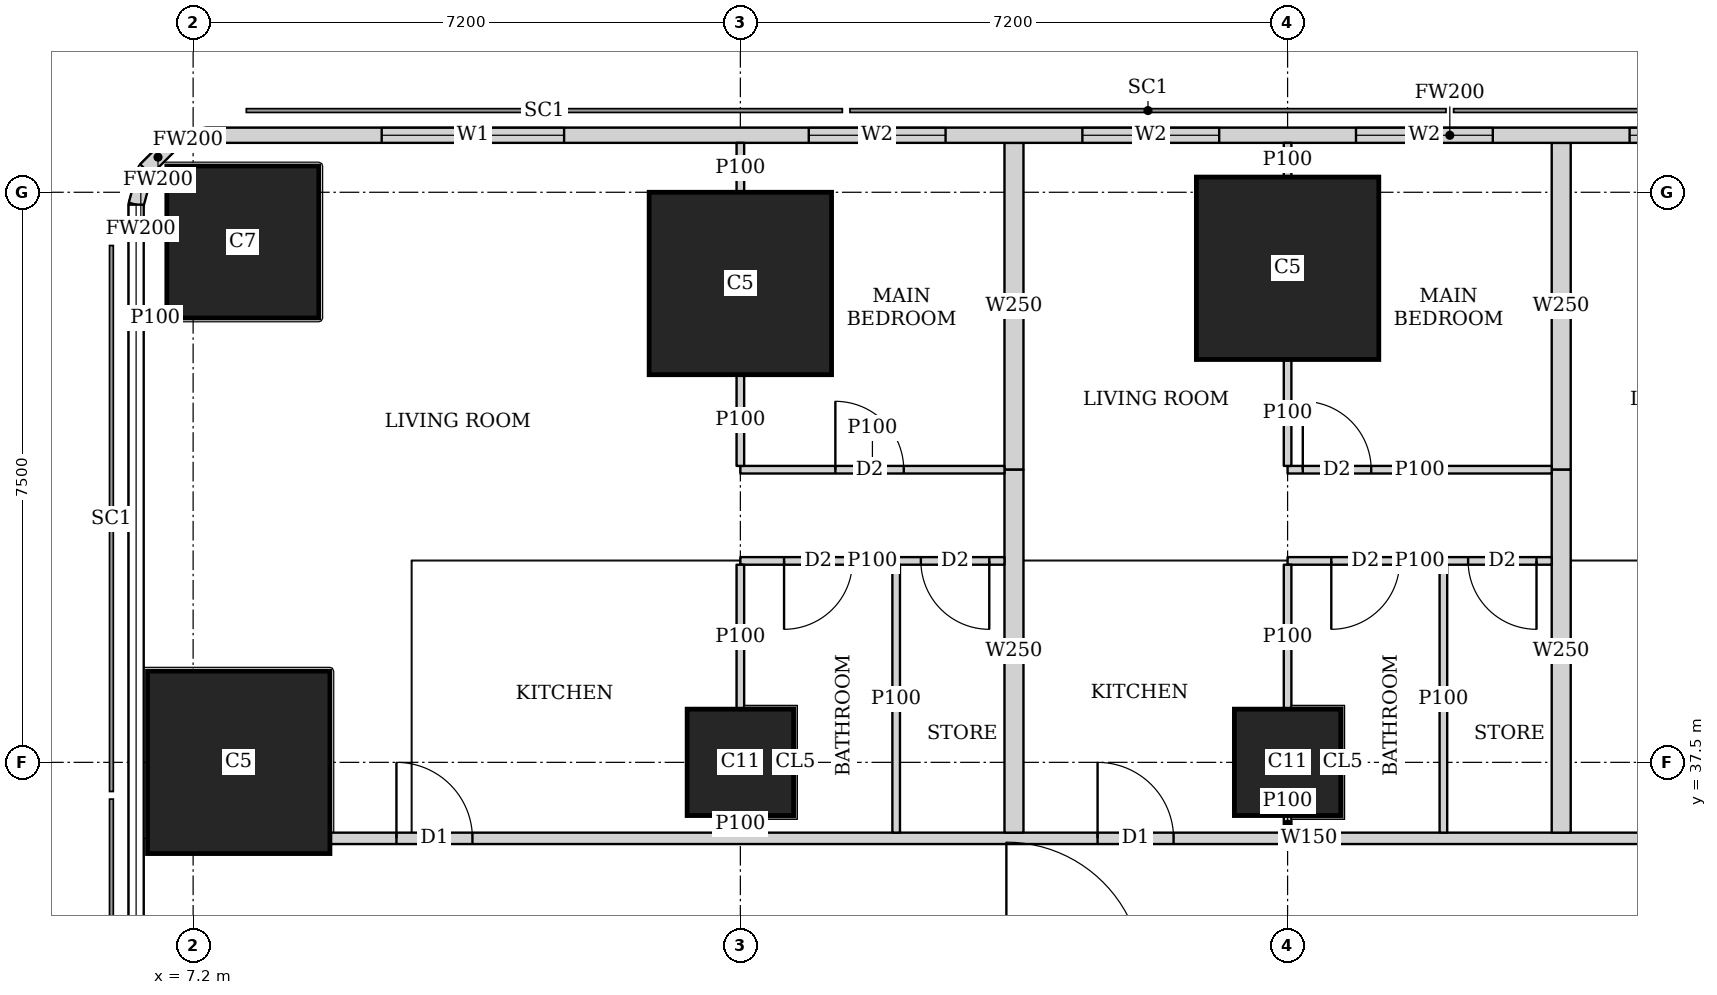
"""IFC4 building model, lengths in metres.
Left out: names, types, materials, properties, quantities, classifications, styles, units other than length and angle.
Written with IfcOpenShell. Run it as: python <this file> out.ifc"""

import sys

from ifc_helpers import new_model, si_unit, direction, frame, frame_2d, origin, origin_2d, place, context, subcontext, project, spatial, rectangle, extrude, element, fill, save


model = new_model("IFC4")
c1 = context("Model", 3, precision=1e-05, world=origin(), true_north=direction((0.0, 1.0)))
c2 = subcontext(c1, "Body", "Model", "MODEL_VIEW")
j1 = project(units=[si_unit("LENGTHUNIT", "METRE"), si_unit("PLANEANGLEUNIT", "RADIAN")], contexts=[c1])
p1 = place(None, origin())
s1 = spatial("IfcSite", under=j1, at=p1, CompositionType="ELEMENT")
p2 = place(p1, origin())
s2 = spatial("IfcBuilding", under=s1, at=p2, CompositionType="ELEMENT")
p3 = place(p2, frame((0.0, 0.0, 208.7)))
s3 = spatial("IfcBuildingStorey", under=s2, at=p3, CompositionType="ELEMENT", Elevation=208.7)
p4 = place(p3, frame((7.8, 37.5, 0.0), z_axis=(0.0, 0.0, 1.0), x_axis=(1.0, 0.0, 0.0)))
e1 = element("IfcColumn", 1, at=p4, inside=s3, PredefinedType="COLUMN", context=c2, shape_type="SweptSolid", body=[
    extrude(rectangle(XDim=2.4, YDim=2.4, at=origin_2d()), origin(), (0.0, 0.0, 1.0), 3.75),
])
for number, where, z_axis, x_axis in (
    (2, (14.4, 37.5, 0.0), (0.0, 0.0, 1.0), (1.0, 0.0, 0.0)),
    (3, (21.6, 37.5, 0.0), (0.0, 0.0, 1.0), (1.0, 0.0, 0.0)),
):
    element("IfcColumn", number, at=place(p3, frame(where, z_axis=z_axis, x_axis=x_axis)), inside=s3, PredefinedType="COLUMN", context=c2, shape_type="SweptSolid", body=[
        extrude(rectangle(XDim=1.4, YDim=1.4, at=origin_2d()), origin(), (0.0, 0.0, 1.0), 3.75),
    ])
p5 = place(p3, frame((7.854, 44.346, 0.0), z_axis=(0.0, 0.0, 1.0), x_axis=(1.0, 0.0, 0.0)))
e4 = element("IfcColumn", 4, at=p5, inside=s3, PredefinedType="COLUMN", context=c2, shape_type="SweptSolid", body=[
    extrude(rectangle(XDim=2.0, YDim=2.0, at=origin_2d()), origin(), (0.0, 0.0, 1.0), 3.75),
])
for number, where, z_axis, x_axis in (
    (5, (14.4, 43.8, 0.0), (0.0, 0.0, 1.0), (1.0, 0.0, 0.0)),
    (6, (21.6, 44.0, 0.0), (0.0, 0.0, 1.0), (1.0, 0.0, 0.0)),
):
    element("IfcColumn", number, at=place(p3, frame(where, z_axis=z_axis, x_axis=x_axis)), inside=s3, PredefinedType="COLUMN", context=c2, shape_type="SweptSolid", body=[
        extrude(rectangle(XDim=2.4, YDim=2.4, at=origin_2d()), origin(), (0.0, 0.0, 1.0), 3.75),
    ])
p6 = place(p3, frame((40.106, 45.75, 0.0), z_axis=(0.0, 0.0, 1.0), x_axis=(-1.0, 0.0, 0.0)))
e7 = element("IfcWall", 7, at=p6, inside=s3, PredefinedType="SOLIDWALL", context=c2, shape_type="SweptSolid", body=[
    extrude(rectangle(XDim=32.743, YDim=0.2, at=frame_2d((16.372, 0.0))), origin(), (0.0, 0.0, 1.0), 3.5),
])
p7 = place(p6, frame((8.606, 0.0, 0.9)))
e8 = element("IfcOpeningElement", 8, at=p7, cuts=e7, PredefinedType="OPENING", context=c2, shape_type="SweptSolid", body=[
    extrude(rectangle(XDim=1.8, YDim=1.5, at=frame_2d((0.9, 0.75))), frame((0.0, 0.11, 0.0), z_axis=(0.0, -1.0, 0.0), x_axis=(1.0, 0.0, 0.0)), (0.0, 0.0, 1.0), 0.22),
])
p8 = place(p6, frame((12.206, 0.0, 0.9)))
e9 = element("IfcOpeningElement", 9, at=p8, cuts=e7, PredefinedType="OPENING", context=c2, shape_type="SweptSolid", body=[
    extrude(rectangle(XDim=1.8, YDim=1.5, at=frame_2d((0.9, 0.75))), frame((0.0, 0.11, 0.0), z_axis=(0.0, -1.0, 0.0), x_axis=(1.0, 0.0, 0.0)), (0.0, 0.0, 1.0), 0.22),
])
p9 = place(p6, frame((15.806, 0.0, 0.9)))
e10 = element("IfcOpeningElement", 10, at=p9, cuts=e7, PredefinedType="OPENING", context=c2, shape_type="SweptSolid", body=[
    extrude(rectangle(XDim=1.8, YDim=1.5, at=frame_2d((0.9, 0.75))), frame((0.0, 0.11, 0.0), z_axis=(0.0, -1.0, 0.0), x_axis=(1.0, 0.0, 0.0)), (0.0, 0.0, 1.0), 0.22),
])
p10 = place(p6, frame((19.406, 0.0, 0.9)))
e11 = element("IfcOpeningElement", 11, at=p10, cuts=e7, PredefinedType="OPENING", context=c2, shape_type="SweptSolid", body=[
    extrude(rectangle(XDim=1.8, YDim=1.5, at=frame_2d((0.9, 0.75))), frame((0.0, 0.11, 0.0), z_axis=(0.0, -1.0, 0.0), x_axis=(1.0, 0.0, 0.0)), (0.0, 0.0, 1.0), 0.22),
])
p11 = place(p6, frame((23.006, 0.0, 0.9)))
e12 = element("IfcOpeningElement", 12, at=p11, cuts=e7, PredefinedType="OPENING", context=c2, shape_type="SweptSolid", body=[
    extrude(rectangle(XDim=1.8, YDim=1.5, at=frame_2d((0.9, 0.75))), frame((0.0, 0.11, 0.0), z_axis=(0.0, -1.0, 0.0), x_axis=(1.0, 0.0, 0.0)), (0.0, 0.0, 1.0), 0.22),
])
p12 = place(p6, frame((28.025, 0.0, 0.9)))
e13 = element("IfcOpeningElement", 13, at=p12, cuts=e7, PredefinedType="OPENING", context=c2, shape_type="SweptSolid", body=[
    extrude(rectangle(XDim=2.4, YDim=1.5, at=frame_2d((1.2, 0.75))), frame((0.0, 0.11, 0.0), z_axis=(0.0, -1.0, 0.0), x_axis=(1.0, 0.0, 0.0)), (0.0, 0.0, 1.0), 0.22),
])
p13 = place(p3, frame((7.363, 45.75, 0.0), z_axis=(0.0, 0.0, 1.0), x_axis=(-0.965655254015, -0.259826731483, 0.0)))
e14 = element("IfcWall", 14, at=p13, inside=s3, PredefinedType="SOLIDWALL", context=c2, shape_type="SweptSolid", body=[
    extrude(rectangle(XDim=0.477, YDim=0.2, at=frame_2d((0.239, 0.0))), origin(), (0.0, 0.0, 1.0), 3.5),
])
p14 = place(p3, frame((6.902, 45.626, 0.0), z_axis=(0.0, 0.0, 1.0), x_axis=(-0.707369890659, -0.706843573776, 0.0)))
e15 = element("IfcWall", 15, at=p14, inside=s3, PredefinedType="SOLIDWALL", context=c2, shape_type="SweptSolid", body=[
    extrude(rectangle(XDim=0.464, YDim=0.2, at=frame_2d((0.232, 0.0))), origin(), (0.0, 0.0, 1.0), 3.5),
])
p15 = place(p3, frame((6.574, 45.298, 0.0), z_axis=(0.0, 0.0, 1.0), x_axis=(-0.259698463175, -0.965689757751, 0.0)))
e16 = element("IfcWall", 16, at=p15, inside=s3, PredefinedType="SOLIDWALL", context=c2, shape_type="SweptSolid", body=[
    extrude(rectangle(XDim=0.478, YDim=0.2, at=frame_2d((0.239, 0.0))), origin(), (0.0, 0.0, 1.0), 3.5),
])
p16 = place(p3, frame((9.001, 36.5, 0.0), z_axis=(0.0, 0.0, 1.0), x_axis=(1.0, 0.0, 0.0)))
e17 = element("IfcWall", 17, at=p16, inside=s3, PredefinedType="SOLIDWALL", context=c2, shape_type="SweptSolid", body=[
    extrude(rectangle(XDim=25.764, YDim=0.15, at=frame_2d((12.882, 0.0))), origin(), (0.0, 0.0, 1.0), 3.5),
])
p17 = place(p16, frame((0.874, 0.0, 0.0)))
e18 = element("IfcOpeningElement", 18, at=p17, cuts=e17, PredefinedType="OPENING", context=c2, shape_type="SweptSolid", body=[
    extrude(rectangle(XDim=1.0, YDim=2.1, at=frame_2d((0.5, 1.05))), frame((0.0, 0.085, 0.0), z_axis=(0.0, -1.0, 0.0), x_axis=(1.0, 0.0, 0.0)), (0.0, 0.0, 1.0), 0.17),
])
p18 = place(p16, frame((10.099, 0.0, 0.0)))
e19 = element("IfcOpeningElement", 19, at=p18, cuts=e17, PredefinedType="OPENING", context=c2, shape_type="SweptSolid", body=[
    extrude(rectangle(XDim=1.0, YDim=2.1, at=frame_2d((0.5, 1.05))), frame((0.0, 0.085, 0.0), z_axis=(0.0, -1.0, 0.0), x_axis=(1.0, 0.0, 0.0)), (0.0, 0.0, 1.0), 0.17),
])
p19 = place(p16, frame((17.356, 0.0, 0.0)))
e20 = element("IfcOpeningElement", 20, at=p19, cuts=e17, PredefinedType="OPENING", context=c2, shape_type="SweptSolid", body=[
    extrude(rectangle(XDim=1.0, YDim=2.1, at=frame_2d((0.5, 1.05))), frame((0.0, 0.085, 0.0), z_axis=(0.0, -1.0, 0.0), x_axis=(1.0, 0.0, 0.0)), (0.0, 0.0, 1.0), 0.17),
])
p20 = place(p3, frame((6.854, 43.346, 0.0), z_axis=(0.0, 0.0, 1.0), x_axis=(-1.0, 0.0, 0.0)))
e21 = element("IfcWall", 21, at=p20, inside=s3, PredefinedType="PARTITIONING", context=c2, shape_type="SweptSolid", body=[
    extrude(rectangle(XDim=0.304, YDim=0.1, at=frame_2d((0.152, 0.0))), origin(), (0.0, 0.0, 1.0), 2.05),
])
p21 = place(p3, frame((14.4, 41.35, 0.0), z_axis=(0.0, 0.0, 1.0), x_axis=(1.0, 0.0, 0.0)))
e22 = element("IfcWall", 22, at=p21, inside=s3, PredefinedType="PARTITIONING", context=c2, shape_type="SweptSolid", body=[
    extrude(rectangle(XDim=3.475, YDim=0.1, at=frame_2d((1.738, 0.0))), origin(), (0.0, 0.0, 1.0), 3.5),
])
p22 = place(p21, frame((1.25, 0.0, 0.0)))
e23 = element("IfcOpeningElement", 23, at=p22, cuts=e22, PredefinedType="OPENING", context=c2, shape_type="SweptSolid", body=[
    extrude(rectangle(XDim=0.9, YDim=2.1, at=frame_2d((0.45, 1.05))), frame((0.0, 0.06, 0.0), z_axis=(0.0, -1.0, 0.0), x_axis=(1.0, 0.0, 0.0)), (0.0, 0.0, 1.0), 0.12),
])
p23 = place(p3, frame((14.4, 40.15, 0.0), z_axis=(0.0, 0.0, 1.0), x_axis=(1.0, 0.0, 0.0)))
e24 = element("IfcWall", 24, at=p23, inside=s3, PredefinedType="PARTITIONING", context=c2, shape_type="SweptSolid", body=[
    extrude(rectangle(XDim=3.475, YDim=0.1, at=frame_2d((1.738, 0.0))), origin(), (0.0, 0.0, 1.0), 3.5),
])
p24 = place(p23, frame((0.575, 0.0, 0.0)))
e25 = element("IfcOpeningElement", 25, at=p24, cuts=e24, PredefinedType="OPENING", context=c2, shape_type="SweptSolid", body=[
    extrude(rectangle(XDim=0.9, YDim=2.1, at=frame_2d((0.45, 1.05))), frame((0.0, 0.06, 0.0), z_axis=(0.0, -1.0, 0.0), x_axis=(1.0, 0.0, 0.0)), (0.0, 0.0, 1.0), 0.12),
])
p25 = place(p23, frame((2.375, 0.0, 0.0)))
e26 = element("IfcOpeningElement", 26, at=p25, cuts=e24, PredefinedType="OPENING", context=c2, shape_type="SweptSolid", body=[
    extrude(rectangle(XDim=0.9, YDim=2.1, at=frame_2d((0.45, 1.05))), frame((0.0, 0.06, 0.0), z_axis=(0.0, -1.0, 0.0), x_axis=(1.0, 0.0, 0.0)), (0.0, 0.0, 1.0), 0.12),
])
p26 = place(p3, frame((14.4, 41.4, 0.0), z_axis=(0.0, 0.0, 1.0), x_axis=(0.0, 1.0, 0.0)))
e27 = element("IfcWall", 27, at=p26, inside=s3, PredefinedType="PARTITIONING", context=c2, shape_type="SweptSolid", body=[
    extrude(rectangle(XDim=1.199, YDim=0.1, at=frame_2d((0.6, 0.0))), origin(), (0.0, 0.0, 1.0), 3.5),
])
p27 = place(p3, frame((14.4, 45.001, 0.0), z_axis=(0.0, 0.0, 1.0), x_axis=(0.0, 1.0, 0.0)))
e28 = element("IfcWall", 28, at=p27, inside=s3, PredefinedType="PARTITIONING", context=c2, shape_type="SweptSolid", body=[
    extrude(rectangle(XDim=0.649, YDim=0.1, at=frame_2d((0.324, 0.0))), origin(), (0.0, 0.0, 1.0), 3.5),
])
p28 = place(p3, frame((14.4, 36.575, 0.0), z_axis=(0.0, 0.0, 1.0), x_axis=(0.0, 1.0, 0.0)))
e29 = element("IfcWall", 29, at=p28, inside=s3, PredefinedType="PARTITIONING", context=c2, shape_type="SweptSolid", body=[
    extrude(rectangle(XDim=0.224, YDim=0.1, at=frame_2d((0.112, 0.0))), origin(), (0.0, 0.0, 1.0), 3.5),
])
p29 = place(p3, frame((14.4, 38.201, 0.0), z_axis=(0.0, 0.0, 1.0), x_axis=(0.0, 1.0, 0.0)))
e30 = element("IfcWall", 30, at=p29, inside=s3, PredefinedType="PARTITIONING", context=c2, shape_type="SweptSolid", body=[
    extrude(rectangle(XDim=1.899, YDim=0.1, at=frame_2d((0.95, 0.0))), origin(), (0.0, 0.0, 1.0), 3.5),
])
p30 = place(p3, frame((16.45, 36.575, 0.0), z_axis=(0.0, 0.0, 1.0), x_axis=(0.0, 1.0, 0.0)))
e31 = element("IfcWall", 31, at=p30, inside=s3, PredefinedType="PARTITIONING", context=c2, shape_type="SweptSolid", body=[
    extrude(rectangle(XDim=3.525, YDim=0.1, at=frame_2d((1.763, 0.0))), origin(), (0.0, 0.0, 1.0), 3.5),
])
p31 = place(p3, frame((21.6, 41.35, 0.0), z_axis=(0.0, 0.0, 1.0), x_axis=(1.0, 0.0, 0.0)))
e32 = element("IfcWall", 32, at=p31, inside=s3, PredefinedType="PARTITIONING", context=c2, shape_type="SweptSolid", body=[
    extrude(rectangle(XDim=3.475, YDim=0.1, at=frame_2d((1.737, 0.0))), origin(), (0.0, 0.0, 1.0), 3.5),
])
p32 = place(p31, frame((0.2, 0.0, 0.0)))
e33 = element("IfcOpeningElement", 33, at=p32, cuts=e32, PredefinedType="OPENING", context=c2, shape_type="SweptSolid", body=[
    extrude(rectangle(XDim=0.9, YDim=2.1, at=frame_2d((0.45, 1.05))), frame((0.0, 0.06, 0.0), z_axis=(0.0, -1.0, 0.0), x_axis=(1.0, 0.0, 0.0)), (0.0, 0.0, 1.0), 0.12),
])
p33 = place(p3, frame((21.6, 40.15, 0.0), z_axis=(0.0, 0.0, 1.0), x_axis=(1.0, 0.0, 0.0)))
e34 = element("IfcWall", 34, at=p33, inside=s3, PredefinedType="PARTITIONING", context=c2, shape_type="SweptSolid", body=[
    extrude(rectangle(XDim=3.475, YDim=0.1, at=frame_2d((1.737, 0.0))), origin(), (0.0, 0.0, 1.0), 3.5),
])
p34 = place(p33, frame((0.575, 0.0, 0.0)))
e35 = element("IfcOpeningElement", 35, at=p34, cuts=e34, PredefinedType="OPENING", context=c2, shape_type="SweptSolid", body=[
    extrude(rectangle(XDim=0.9, YDim=2.1, at=frame_2d((0.45, 1.05))), frame((0.0, 0.06, 0.0), z_axis=(0.0, -1.0, 0.0), x_axis=(1.0, 0.0, 0.0)), (0.0, 0.0, 1.0), 0.12),
])
p35 = place(p33, frame((2.375, 0.0, 0.0)))
e36 = element("IfcOpeningElement", 36, at=p35, cuts=e34, PredefinedType="OPENING", context=c2, shape_type="SweptSolid", body=[
    extrude(rectangle(XDim=0.9, YDim=2.1, at=frame_2d((0.45, 1.05))), frame((0.0, 0.06, 0.0), z_axis=(0.0, -1.0, 0.0), x_axis=(1.0, 0.0, 0.0)), (0.0, 0.0, 1.0), 0.12),
])
p36 = place(p3, frame((21.6, 41.4, 0.0), z_axis=(0.0, 0.0, 1.0), x_axis=(0.0, 1.0, 0.0)))
e37 = element("IfcWall", 37, at=p36, inside=s3, PredefinedType="PARTITIONING", context=c2, shape_type="SweptSolid", body=[
    extrude(rectangle(XDim=1.399, YDim=0.1, at=frame_2d((0.7, 0.0))), origin(), (0.0, 0.0, 1.0), 3.5),
])
p37 = place(p3, frame((21.6, 45.201, 0.0), z_axis=(0.0, 0.0, 1.0), x_axis=(0.0, 1.0, 0.0)))
e38 = element("IfcWall", 38, at=p37, inside=s3, PredefinedType="PARTITIONING", context=c2, shape_type="SweptSolid", body=[
    extrude(rectangle(XDim=0.449, YDim=0.1, at=frame_2d((0.225, 0.0))), origin(), (0.0, 0.0, 1.0), 3.5),
])
p38 = place(p3, frame((21.6, 36.575, 0.0), z_axis=(0.0, 0.0, 1.0), x_axis=(0.0, 1.0, 0.0)))
e39 = element("IfcWall", 39, at=p38, inside=s3, PredefinedType="PARTITIONING", context=c2, shape_type="SweptSolid", body=[
    extrude(rectangle(XDim=0.224, YDim=0.1, at=frame_2d((0.112, 0.0))), origin(), (0.0, 0.0, 1.0), 3.5),
])
p39 = place(p3, frame((21.6, 38.201, 0.0), z_axis=(0.0, 0.0, 1.0), x_axis=(0.0, 1.0, 0.0)))
e40 = element("IfcWall", 40, at=p39, inside=s3, PredefinedType="PARTITIONING", context=c2, shape_type="SweptSolid", body=[
    extrude(rectangle(XDim=1.899, YDim=0.1, at=frame_2d((0.95, 0.0))), origin(), (0.0, 0.0, 1.0), 3.5),
])
p40 = place(p3, frame((23.65, 36.575, 0.0), z_axis=(0.0, 0.0, 1.0), x_axis=(0.0, 1.0, 0.0)))
e41 = element("IfcWall", 41, at=p40, inside=s3, PredefinedType="PARTITIONING", context=c2, shape_type="SweptSolid", body=[
    extrude(rectangle(XDim=3.525, YDim=0.1, at=frame_2d((1.763, 0.0))), origin(), (0.0, 0.0, 1.0), 3.5),
])
p41 = place(p3, frame((18.0, 41.35, 0.0), z_axis=(0.0, 0.0, 1.0), x_axis=(0.0, 1.0, 0.0)))
e42 = element("IfcWall", 42, at=p41, inside=s3, PredefinedType="SOLIDWALL", context=c2, shape_type="SweptSolid", body=[
    extrude(rectangle(XDim=4.3, YDim=0.25, at=frame_2d((2.15, 0.0))), origin(), (0.0, 0.0, 1.0), 2.05),
])
p42 = place(p3, frame((18.0, 36.575, 0.0), z_axis=(0.0, 0.0, 1.0), x_axis=(0.0, 1.0, 0.0)))
e43 = element("IfcWall", 43, at=p42, inside=s3, PredefinedType="SOLIDWALL", context=c2, shape_type="SweptSolid", body=[
    extrude(rectangle(XDim=4.775, YDim=0.25, at=frame_2d((2.388, 0.0))), origin(), (0.0, 0.0, 1.0), 3.5),
])
p43 = place(p3, frame((25.2, 41.35, 0.0), z_axis=(0.0, 0.0, 1.0), x_axis=(0.0, 1.0, 0.0)))
e44 = element("IfcWall", 44, at=p43, inside=s3, PredefinedType="SOLIDWALL", context=c2, shape_type="SweptSolid", body=[
    extrude(rectangle(XDim=4.3, YDim=0.25, at=frame_2d((2.15, 0.0))), origin(), (0.0, 0.0, 1.0), 2.05),
])
p44 = place(p3, frame((25.2, 36.575, 0.0), z_axis=(0.0, 0.0, 1.0), x_axis=(0.0, 1.0, 0.0)))
e45 = element("IfcWall", 45, at=p44, inside=s3, PredefinedType="SOLIDWALL", context=c2, shape_type="SweptSolid", body=[
    extrude(rectangle(XDim=4.775, YDim=0.25, at=frame_2d((2.388, 0.0))), origin(), (0.0, 0.0, 1.0), 3.5),
])
p45 = place(p8, origin())
e46 = element("IfcWindow", 46, at=p45, inside=s3, PartitioningType="SINGLE_PANEL", PredefinedType="WINDOW", context=c2, shape_type="SweptSolid", body=[
    extrude(rectangle(XDim=1.8, YDim=1.5, at=frame_2d((0.9, 0.75))), frame((0.0, 0.03, 0.0), z_axis=(0.0, -1.0, 0.0), x_axis=(1.0, 0.0, 0.0)), (0.0, 0.0, 1.0), 0.06),
])
fill(e9, e46)
p46 = place(p9, origin())
e47 = element("IfcWindow", 47, at=p46, inside=s3, PartitioningType="SINGLE_PANEL", PredefinedType="WINDOW", context=c2, shape_type="SweptSolid", body=[
    extrude(rectangle(XDim=1.8, YDim=1.5, at=frame_2d((0.9, 0.75))), frame((0.0, 0.03, 0.0), z_axis=(0.0, -1.0, 0.0), x_axis=(1.0, 0.0, 0.0)), (0.0, 0.0, 1.0), 0.06),
])
fill(e10, e47)
p47 = place(p10, origin())
e48 = element("IfcWindow", 48, at=p47, inside=s3, PartitioningType="SINGLE_PANEL", PredefinedType="WINDOW", context=c2, shape_type="SweptSolid", body=[
    extrude(rectangle(XDim=1.8, YDim=1.5, at=frame_2d((0.9, 0.75))), frame((0.0, 0.03, 0.0), z_axis=(0.0, -1.0, 0.0), x_axis=(1.0, 0.0, 0.0)), (0.0, 0.0, 1.0), 0.06),
])
fill(e11, e48)
p48 = place(p11, origin())
e49 = element("IfcWindow", 49, at=p48, inside=s3, PartitioningType="SINGLE_PANEL", PredefinedType="WINDOW", context=c2, shape_type="SweptSolid", body=[
    extrude(rectangle(XDim=1.8, YDim=1.5, at=frame_2d((0.9, 0.75))), frame((0.0, 0.03, 0.0), z_axis=(0.0, -1.0, 0.0), x_axis=(1.0, 0.0, 0.0)), (0.0, 0.0, 1.0), 0.06),
])
fill(e12, e49)
p49 = place(p12, origin())
e50 = element("IfcWindow", 50, at=p49, inside=s3, PartitioningType="SINGLE_PANEL", PredefinedType="WINDOW", context=c2, shape_type="SweptSolid", body=[
    extrude(rectangle(XDim=2.4, YDim=1.5, at=frame_2d((1.2, 0.75))), frame((0.0, 0.03, 0.0), z_axis=(0.0, -1.0, 0.0), x_axis=(1.0, 0.0, 0.0)), (0.0, 0.0, 1.0), 0.06),
])
fill(e13, e50)
p50 = place(p22, origin())
e51 = element("IfcDoor", 51, at=p50, inside=s3, OperationType="SINGLE_SWING_LEFT", PredefinedType="DOOR", context=c2, shape_type="SweptSolid", body=[
    extrude(rectangle(XDim=0.9, YDim=2.1, at=frame_2d((0.45, 1.05))), frame((0.0, 0.025, 0.0), z_axis=(0.0, -1.0, 0.0), x_axis=(1.0, 0.0, 0.0)), (0.0, 0.0, 1.0), 0.05),
])
fill(e23, e51)
p51 = place(p24, origin())
e52 = element("IfcDoor", 52, at=p51, inside=s3, OperationType="SINGLE_SWING_RIGHT", PredefinedType="DOOR", context=c2, shape_type="SweptSolid", body=[
    extrude(rectangle(XDim=0.9, YDim=2.1, at=frame_2d((0.45, 1.05))), frame((0.0, 0.025, 0.0), z_axis=(0.0, -1.0, 0.0), x_axis=(1.0, 0.0, 0.0)), (0.0, 0.0, 1.0), 0.05),
])
fill(e25, e52)
p52 = place(p25, origin())
e53 = element("IfcDoor", 53, at=p52, inside=s3, OperationType="SINGLE_SWING_LEFT", PredefinedType="DOOR", context=c2, shape_type="SweptSolid", body=[
    extrude(rectangle(XDim=0.9, YDim=2.1, at=frame_2d((0.45, 1.05))), frame((0.0, 0.025, 0.0), z_axis=(0.0, -1.0, 0.0), x_axis=(1.0, 0.0, 0.0)), (0.0, 0.0, 1.0), 0.05),
])
fill(e26, e53)
p53 = place(p17, origin())
e54 = element("IfcDoor", 54, at=p53, inside=s3, OperationType="SINGLE_SWING_LEFT", PredefinedType="DOOR", context=c2, shape_type="SweptSolid", body=[
    extrude(rectangle(XDim=1.0, YDim=2.1, at=frame_2d((0.5, 1.05))), frame((0.0, 0.025, 0.0), z_axis=(0.0, -1.0, 0.0), x_axis=(1.0, 0.0, 0.0)), (0.0, 0.0, 1.0), 0.05),
])
fill(e18, e54)
p54 = place(p32, origin())
e55 = element("IfcDoor", 55, at=p54, inside=s3, OperationType="SINGLE_SWING_LEFT", PredefinedType="DOOR", context=c2, shape_type="SweptSolid", body=[
    extrude(rectangle(XDim=0.9, YDim=2.1, at=frame_2d((0.45, 1.05))), frame((0.0, 0.025, 0.0), z_axis=(0.0, -1.0, 0.0), x_axis=(1.0, 0.0, 0.0)), (0.0, 0.0, 1.0), 0.05),
])
fill(e33, e55)
p55 = place(p34, origin())
e56 = element("IfcDoor", 56, at=p55, inside=s3, OperationType="SINGLE_SWING_RIGHT", PredefinedType="DOOR", context=c2, shape_type="SweptSolid", body=[
    extrude(rectangle(XDim=0.9, YDim=2.1, at=frame_2d((0.45, 1.05))), frame((0.0, 0.025, 0.0), z_axis=(0.0, -1.0, 0.0), x_axis=(1.0, 0.0, 0.0)), (0.0, 0.0, 1.0), 0.05),
])
fill(e35, e56)
p56 = place(p35, origin())
e57 = element("IfcDoor", 57, at=p56, inside=s3, OperationType="SINGLE_SWING_LEFT", PredefinedType="DOOR", context=c2, shape_type="SweptSolid", body=[
    extrude(rectangle(XDim=0.9, YDim=2.1, at=frame_2d((0.45, 1.05))), frame((0.0, 0.025, 0.0), z_axis=(0.0, -1.0, 0.0), x_axis=(1.0, 0.0, 0.0)), (0.0, 0.0, 1.0), 0.05),
])
fill(e36, e57)
p57 = place(p18, origin())
e58 = element("IfcDoor", 58, at=p57, inside=s3, OperationType="SINGLE_SWING_LEFT", PredefinedType="DOOR", context=c2, shape_type="SweptSolid", body=[
    extrude(rectangle(XDim=1.0, YDim=2.1, at=frame_2d((0.5, 1.05))), frame((0.0, 0.025, 0.0), z_axis=(0.0, -1.0, 0.0), x_axis=(1.0, 0.0, 0.0)), (0.0, 0.0, 1.0), 0.05),
])
fill(e19, e58)
save(model, sys.argv[1])
